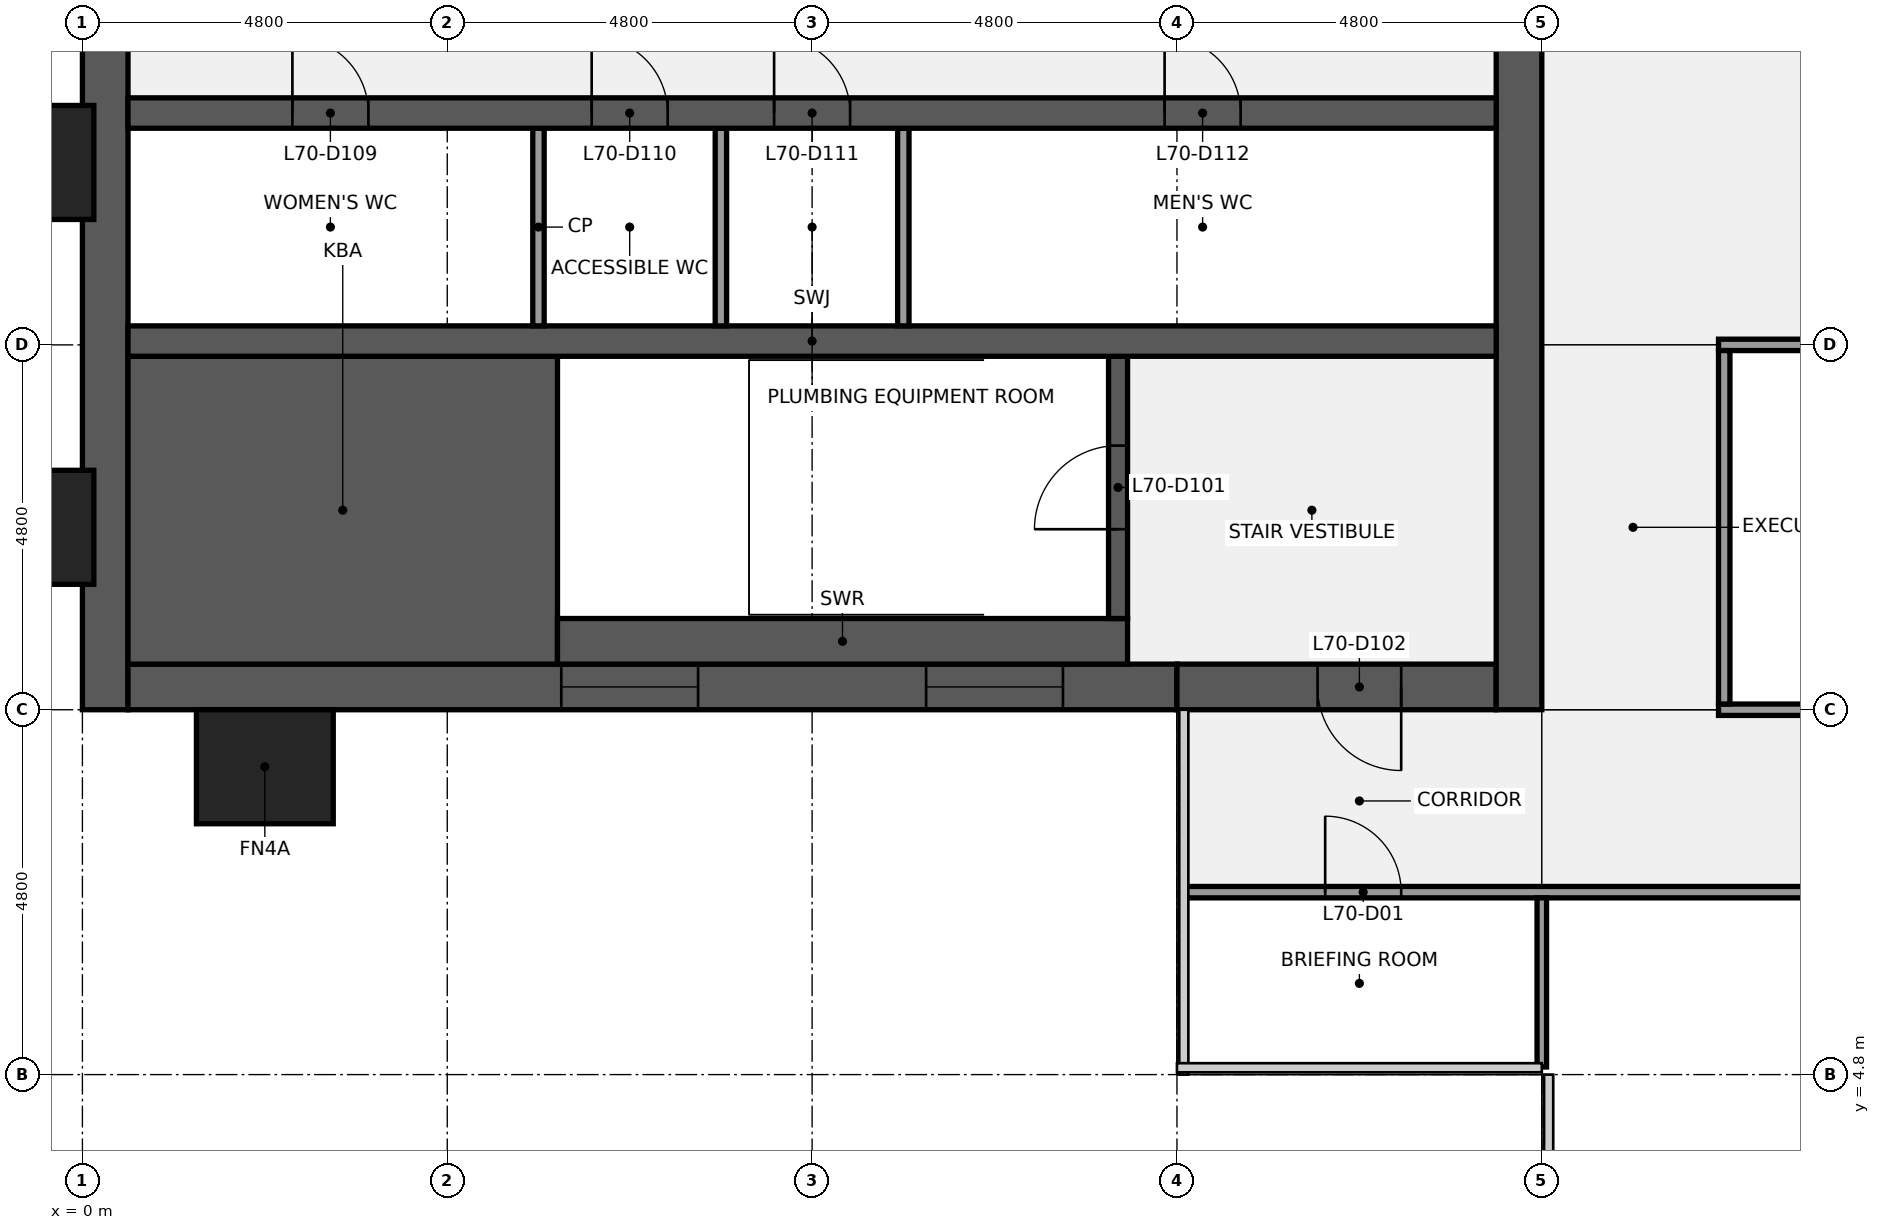
"""IFC4 building model, lengths in metres.
Left out: names, types, materials, properties, quantities, classifications, styles, units other than length and angle.
Written with IfcOpenShell. Run it as: python <this file> out.ifc"""

import sys

from ifc_helpers import new_model, si_unit, direction, frame, frame_2d, origin, origin_2d, place, context, subcontext, project, spatial, rectangle, extrude, element, fill, save


model = new_model("IFC4")
c1 = context("Model", 3, precision=1e-05, world=origin(), true_north=direction((0.0, 1.0)))
c2 = subcontext(c1, "Body", "Model", "MODEL_VIEW")
j1 = project(units=[si_unit("LENGTHUNIT", "METRE"), si_unit("PLANEANGLEUNIT", "RADIAN")], contexts=[c1])
p1 = place(None, origin())
s1 = spatial("IfcSite", under=j1, at=p1, CompositionType="ELEMENT")
p2 = place(p1, origin())
s2 = spatial("IfcBuilding", under=s1, at=p2, CompositionType="ELEMENT")
p3 = place(p2, frame((0.0, 0.0, 318.3)))
s3 = spatial("IfcBuildingStorey", under=s2, at=p3, CompositionType="ELEMENT", Elevation=318.3)
p4 = place(p3, frame((0.3, 9.6, 0.0), z_axis=(0.0, 0.0, 1.0), x_axis=(0.0, 1.0, 0.0)))
e1 = element("IfcWall", 1, at=p4, inside=s3, PredefinedType="SHEAR", context=c2, shape_type="SweptSolid", body=[
    extrude(rectangle(XDim=28.8, YDim=0.6, at=frame_2d((14.4, 0.0))), origin(), (0.0, 0.0, 1.0), 3.84),
])
p5 = place(p4, frame((8.85, 0.0, 0.9)))
e2 = element("IfcOpeningElement", 2, at=p5, cuts=e1, PredefinedType="OPENING", context=c2, shape_type="SweptSolid", body=[
    extrude(rectangle(XDim=1.5, YDim=1.5, at=frame_2d((0.75, 0.75))), frame((0.0, 0.31, 0.0), z_axis=(0.0, -1.0, 0.0), x_axis=(1.0, 0.0, 0.0)), (0.0, 0.0, 1.0), 0.62),
])
p6 = place(p4, frame((18.45, 0.0, 0.9)))
e3 = element("IfcOpeningElement", 3, at=p6, cuts=e1, PredefinedType="OPENING", context=c2, shape_type="SweptSolid", body=[
    extrude(rectangle(XDim=1.5, YDim=1.5, at=frame_2d((0.75, 0.75))), frame((0.0, 0.31, 0.0), z_axis=(0.0, -1.0, 0.0), x_axis=(1.0, 0.0, 0.0)), (0.0, 0.0, 1.0), 0.62),
])
p7 = place(p3, frame((14.4, 9.9, 0.0), z_axis=(0.0, 0.0, 1.0), x_axis=(-1.0, 0.0, 0.0)))
e4 = element("IfcWall", 4, at=p7, inside=s3, PredefinedType="SHEAR", context=c2, shape_type="SweptSolid", body=[
    extrude(rectangle(XDim=13.8, YDim=0.6, at=frame_2d((6.9, 0.0))), origin(), (0.0, 0.0, 1.0), 3.84),
])
p8 = place(p7, frame((6.3, 0.0, 0.9)))
e5 = element("IfcOpeningElement", 5, at=p8, cuts=e4, PredefinedType="OPENING", context=c2, shape_type="SweptSolid", body=[
    extrude(rectangle(XDim=1.8, YDim=1.5, at=frame_2d((0.9, 0.75))), frame((0.0, 0.31, 0.0), z_axis=(0.0, -1.0, 0.0), x_axis=(1.0, 0.0, 0.0)), (0.0, 0.0, 1.0), 0.62),
])
p9 = place(p7, frame((1.5, 0.0, 0.9)))
e6 = element("IfcOpeningElement", 6, at=p9, cuts=e4, PredefinedType="OPENING", context=c2, shape_type="SweptSolid", body=[
    extrude(rectangle(XDim=1.8, YDim=1.5, at=frame_2d((0.9, 0.75))), frame((0.0, 0.31, 0.0), z_axis=(0.0, -1.0, 0.0), x_axis=(1.0, 0.0, 0.0)), (0.0, 0.0, 1.0), 0.62),
])
p10 = place(p3, frame((18.6, 9.9, 0.0), z_axis=(0.0, 0.0, 1.0), x_axis=(-1.0, 0.0, 0.0)))
e7 = element("IfcWall", 7, at=p10, inside=s3, PredefinedType="SHEAR", context=c2, shape_type="SweptSolid", body=[
    extrude(rectangle(XDim=4.2, YDim=0.6, at=frame_2d((2.1, 0.0))), origin(), (0.0, 0.0, 1.0), 3.84),
])
p11 = place(p10, frame((1.25, 0.0, 0.0)))
e8 = element("IfcOpeningElement", 8, at=p11, cuts=e7, PredefinedType="OPENING", context=c2, shape_type="SweptSolid", body=[
    extrude(rectangle(XDim=1.1, YDim=2.1, at=frame_2d((0.55, 1.05))), frame((0.0, 0.31, 0.0), z_axis=(0.0, -1.0, 0.0), x_axis=(1.0, 0.0, 0.0)), (0.0, 0.0, 1.0), 0.62),
])
p12 = place(p3, frame((18.9, 38.4, 0.0), z_axis=(0.0, 0.0, 1.0), x_axis=(0.0, -1.0, 0.0)))
e9 = element("IfcWall", 9, at=p12, inside=s3, PredefinedType="SHEAR", context=c2, shape_type="SweptSolid", body=[
    extrude(rectangle(XDim=28.8, YDim=0.6, at=frame_2d((14.4, 0.0))), origin(), (0.0, 0.0, 1.0), 3.84),
])
p13 = place(p12, frame((18.3, 0.0, 0.0)))
e10 = element("IfcOpeningElement", 10, at=p13, cuts=e9, PredefinedType="OPENING", context=c2, shape_type="SweptSolid", body=[
    extrude(rectangle(XDim=1.8, YDim=2.1, at=frame_2d((0.9, 1.05))), frame((0.0, 0.31, 0.0), z_axis=(0.0, -1.0, 0.0), x_axis=(1.0, 0.0, 0.0)), (0.0, 0.0, 1.0), 0.62),
])
p14 = place(p12, frame((8.7, 0.0, 0.0)))
e11 = element("IfcOpeningElement", 11, at=p14, cuts=e9, PredefinedType="OPENING", context=c2, shape_type="SweptSolid", body=[
    extrude(rectangle(XDim=1.8, YDim=2.1, at=frame_2d((0.9, 1.05))), frame((0.0, 0.31, 0.0), z_axis=(0.0, -1.0, 0.0), x_axis=(1.0, 0.0, 0.0)), (0.0, 0.0, 1.0), 0.62),
])
p15 = place(p3, frame((0.6, 12.225, 0.0), z_axis=(0.0, 0.0, 1.0), x_axis=(1.0, 0.0, 0.0)))
e12 = element("IfcWall", 12, at=p15, inside=s3, PredefinedType="SHEAR", context=c2, shape_type="SweptSolid", body=[
    extrude(rectangle(XDim=5.65, YDim=4.05, at=frame_2d((2.825, 0.0))), origin(), (0.0, 0.0, 1.0), 3.84),
])
p16 = place(p3, frame((6.25, 10.5, 0.0), z_axis=(0.0, 0.0, 1.0), x_axis=(1.0, 0.0, 0.0)))
e13 = element("IfcWall", 13, at=p16, inside=s3, PredefinedType="SHEAR", context=c2, shape_type="SweptSolid", body=[
    extrude(rectangle(XDim=7.5, YDim=0.6, at=frame_2d((3.75, 0.0))), origin(), (0.0, 0.0, 1.0), 3.84),
])
p17 = place(p3, frame((13.625, 10.8, 0.0), z_axis=(0.0, 0.0, 1.0), x_axis=(0.0, 1.0, 0.0)))
e14 = element("IfcWall", 14, at=p17, inside=s3, PredefinedType="SHEAR", context=c2, shape_type="SweptSolid", body=[
    extrude(rectangle(XDim=3.45, YDim=0.25, at=frame_2d((1.725, 0.0))), origin(), (0.0, 0.0, 1.0), 3.84),
])
p18 = place(p17, frame((1.175, 0.0, 0.0)))
e15 = element("IfcOpeningElement", 15, at=p18, cuts=e14, PredefinedType="OPENING", context=c2, shape_type="SweptSolid", body=[
    extrude(rectangle(XDim=1.1, YDim=2.1, at=frame_2d((0.55, 1.05))), frame((0.0, 0.135, 0.0), z_axis=(0.0, -1.0, 0.0), x_axis=(1.0, 0.0, 0.0)), (0.0, 0.0, 1.0), 0.27),
])
p19 = place(p3, frame((0.6, 14.45, 0.0), z_axis=(0.0, 0.0, 1.0), x_axis=(1.0, 0.0, 0.0)))
e16 = element("IfcWall", 16, at=p19, inside=s3, PredefinedType="SHEAR", context=c2, shape_type="SweptSolid", body=[
    extrude(rectangle(XDim=18.0, YDim=0.4, at=frame_2d((9.0, 0.0))), origin(), (0.0, 0.0, 1.0), 3.84),
])
for number, where, z_axis, x_axis in (
    (17, (6.0, 14.65, 0.0), (0.0, 0.0, 1.0), (0.0, 1.0, 0.0)),
    (18, (8.4, 14.65, 0.0), (0.0, 0.0, 1.0), (0.0, 1.0, 0.0)),
    (19, (10.8, 14.65, 0.0), (0.0, 0.0, 1.0), (0.0, 1.0, 0.0)),
):
    element("IfcWall", number, at=place(p3, frame(where, z_axis=z_axis, x_axis=x_axis)), inside=s3, PredefinedType="PARTITIONING", context=c2, shape_type="SweptSolid", body=[
        extrude(rectangle(XDim=2.6, YDim=0.15, at=frame_2d((1.3, 0.0))), origin(), (0.0, 0.0, 1.0), 3.84),
    ])
p20 = place(p3, frame((0.6, 17.45, 0.0), z_axis=(0.0, 0.0, 1.0), x_axis=(1.0, 0.0, 0.0)))
e20 = element("IfcWall", 20, at=p20, inside=s3, PredefinedType="SHEAR", context=c2, shape_type="SweptSolid", body=[
    extrude(rectangle(XDim=18.0, YDim=0.4, at=frame_2d((9.0, 0.0))), origin(), (0.0, 0.0, 1.0), 3.84),
])
p21 = place(p20, frame((2.163, 0.0, 0.0)))
e21 = element("IfcOpeningElement", 21, at=p21, cuts=e20, PredefinedType="OPENING", context=c2, shape_type="SweptSolid", body=[
    extrude(rectangle(XDim=1.0, YDim=2.1, at=frame_2d((0.5, 1.05))), frame((0.0, 0.21, 0.0), z_axis=(0.0, -1.0, 0.0), x_axis=(1.0, 0.0, 0.0)), (0.0, 0.0, 1.0), 0.42),
])
p22 = place(p20, frame((6.1, 0.0, 0.0)))
e22 = element("IfcOpeningElement", 22, at=p22, cuts=e20, PredefinedType="OPENING", context=c2, shape_type="SweptSolid", body=[
    extrude(rectangle(XDim=1.0, YDim=2.1, at=frame_2d((0.5, 1.05))), frame((0.0, 0.21, 0.0), z_axis=(0.0, -1.0, 0.0), x_axis=(1.0, 0.0, 0.0)), (0.0, 0.0, 1.0), 0.42),
])
p23 = place(p20, frame((8.5, 0.0, 0.0)))
e23 = element("IfcOpeningElement", 23, at=p23, cuts=e20, PredefinedType="OPENING", context=c2, shape_type="SweptSolid", body=[
    extrude(rectangle(XDim=1.0, YDim=2.1, at=frame_2d((0.5, 1.05))), frame((0.0, 0.21, 0.0), z_axis=(0.0, -1.0, 0.0), x_axis=(1.0, 0.0, 0.0)), (0.0, 0.0, 1.0), 0.42),
])
p24 = place(p20, frame((13.637, 0.0, 0.0)))
e24 = element("IfcOpeningElement", 24, at=p24, cuts=e20, PredefinedType="OPENING", context=c2, shape_type="SweptSolid", body=[
    extrude(rectangle(XDim=1.0, YDim=2.1, at=frame_2d((0.5, 1.05))), frame((0.0, 0.21, 0.0), z_axis=(0.0, -1.0, 0.0), x_axis=(1.0, 0.0, 0.0)), (0.0, 0.0, 1.0), 0.42),
])
p25 = place(p3, frame((14.5, 7.2, 0.0), z_axis=(0.0, 0.0, 1.0), x_axis=(1.0, 0.0, 0.0)))
e25 = element("IfcWall", 25, at=p25, inside=s3, PredefinedType="PARTITIONING", context=c2, shape_type="SweptSolid", body=[
    extrude(rectangle(XDim=28.6, YDim=0.15, at=frame_2d((14.3, 0.0))), origin(), (0.0, 0.0, 1.0), 2.87),
])
p26 = place(p25, frame((1.85, 0.0, 0.0)))
e26 = element("IfcOpeningElement", 26, at=p26, cuts=e25, PredefinedType="OPENING", context=c2, shape_type="SweptSolid", body=[
    extrude(rectangle(XDim=1.0, YDim=2.1, at=frame_2d((0.5, 1.05))), frame((0.0, 0.085, 0.0), z_axis=(0.0, -1.0, 0.0), x_axis=(1.0, 0.0, 0.0)), (0.0, 0.0, 1.0), 0.17),
])
p27 = place(p25, frame((9.0, 0.0, 0.0)))
e27 = element("IfcOpeningElement", 27, at=p27, cuts=e25, PredefinedType="OPENING", context=c2, shape_type="SweptSolid", body=[
    extrude(rectangle(XDim=1.0, YDim=2.1, at=frame_2d((0.5, 1.05))), frame((0.0, 0.085, 0.0), z_axis=(0.0, -1.0, 0.0), x_axis=(1.0, 0.0, 0.0)), (0.0, 0.0, 1.0), 0.17),
])
p28 = place(p25, frame((18.6, 0.0, 0.0)))
e28 = element("IfcOpeningElement", 28, at=p28, cuts=e25, PredefinedType="OPENING", context=c2, shape_type="SweptSolid", body=[
    extrude(rectangle(XDim=1.0, YDim=2.1, at=frame_2d((0.5, 1.05))), frame((0.0, 0.085, 0.0), z_axis=(0.0, -1.0, 0.0), x_axis=(1.0, 0.0, 0.0)), (0.0, 0.0, 1.0), 0.17),
])
p29 = place(p25, frame((25.75, 0.0, 0.0)))
e29 = element("IfcOpeningElement", 29, at=p29, cuts=e25, PredefinedType="OPENING", context=c2, shape_type="SweptSolid", body=[
    extrude(rectangle(XDim=1.0, YDim=2.1, at=frame_2d((0.5, 1.05))), frame((0.0, 0.085, 0.0), z_axis=(0.0, -1.0, 0.0), x_axis=(1.0, 0.0, 0.0)), (0.0, 0.0, 1.0), 0.17),
])
p30 = place(p3, frame((21.525, 9.6, 0.0), z_axis=(0.0, 0.0, 1.0), x_axis=(1.0, 0.0, 0.0)))
e30 = element("IfcWall", 30, at=p30, inside=s3, PredefinedType="PARTITIONING", context=c2, shape_type="SweptSolid", body=[
    extrude(rectangle(XDim=14.55, YDim=0.15, at=frame_2d((7.275, 0.0))), origin(), (0.0, 0.0, 1.0), 2.87),
])
p31 = place(p30, frame((3.175, 0.0, 0.0)))
e31 = element("IfcOpeningElement", 31, at=p31, cuts=e30, PredefinedType="OPENING", context=c2, shape_type="SweptSolid", body=[
    extrude(rectangle(XDim=1.0, YDim=2.1, at=frame_2d((0.5, 1.05))), frame((0.0, 0.085, 0.0), z_axis=(0.0, -1.0, 0.0), x_axis=(1.0, 0.0, 0.0)), (0.0, 0.0, 1.0), 0.17),
])
p32 = place(p30, frame((10.375, 0.0, 0.0)))
e32 = element("IfcOpeningElement", 32, at=p32, cuts=e30, PredefinedType="OPENING", context=c2, shape_type="SweptSolid", body=[
    extrude(rectangle(XDim=1.0, YDim=2.1, at=frame_2d((0.5, 1.05))), frame((0.0, 0.085, 0.0), z_axis=(0.0, -1.0, 0.0), x_axis=(1.0, 0.0, 0.0)), (0.0, 0.0, 1.0), 0.17),
])
p33 = place(p3, frame((21.525, 14.4, 0.0), z_axis=(0.0, 0.0, 1.0), x_axis=(1.0, 0.0, 0.0)))
e33 = element("IfcWall", 33, at=p33, inside=s3, PredefinedType="PARTITIONING", context=c2, shape_type="SweptSolid", body=[
    extrude(rectangle(XDim=2.55, YDim=0.15, at=frame_2d((1.275, 0.0))), origin(), (0.0, 0.0, 1.0), 2.87),
])
p34 = place(p3, frame((19.2, 4.9, 0.0), z_axis=(0.0, 0.0, 1.0), x_axis=(0.0, 1.0, 0.0)))
e34 = element("IfcWall", 34, at=p34, inside=s3, PredefinedType="PARTITIONING", context=c2, shape_type="SweptSolid", body=[
    extrude(rectangle(XDim=2.225, YDim=0.125, at=frame_2d((1.113, 0.0))), origin(), (0.0, 0.0, 1.0), 2.87),
])
p35 = place(p3, frame((21.6, 9.675, 0.0), z_axis=(0.0, 0.0, 1.0), x_axis=(0.0, 1.0, 0.0)))
e35 = element("IfcWall", 35, at=p35, inside=s3, PredefinedType="PARTITIONING", context=c2, shape_type="SweptSolid", body=[
    extrude(rectangle(XDim=4.65, YDim=0.15, at=frame_2d((2.325, 0.0))), origin(), (0.0, 0.0, 1.0), 2.87),
])
for number, where, z_axis, x_axis in (
    (36, (-0.75, 12.0, 0.0), (0.0, 0.0, 1.0), (0.0, 1.0, 0.0)),
    (37, (-0.75, 16.8, 0.0), (0.0, 0.0, 1.0), (0.0, 1.0, 0.0)),
    (38, (2.4, 8.85, 0.0), (0.0, 0.0, 1.0), (1.0, 0.0, 0.0)),
):
    element("IfcColumn", number, at=place(p3, frame(where, z_axis=z_axis, x_axis=x_axis)), inside=s3, PredefinedType="PILASTER", context=c2, shape_type="SweptSolid", body=[
        extrude(rectangle(XDim=1.8, YDim=1.5, at=origin_2d()), origin(), (0.0, 0.0, 1.0), 4.0),
    ])
p36 = place(p18, origin())
e39 = element("IfcDoor", 39, at=p36, inside=s3, OperationType="SINGLE_SWING_LEFT", PredefinedType="DOOR", context=c2, shape_type="SweptSolid", body=[
    extrude(rectangle(XDim=1.1, YDim=2.1, at=frame_2d((0.55, 1.05))), frame((0.0, 0.025, 0.0), z_axis=(0.0, -1.0, 0.0), x_axis=(1.0, 0.0, 0.0)), (0.0, 0.0, 1.0), 0.05),
])
fill(e15, e39)
p37 = place(p11, origin())
e40 = element("IfcDoor", 40, at=p37, inside=s3, OperationType="SINGLE_SWING_LEFT", PredefinedType="DOOR", context=c2, shape_type="SweptSolid", body=[
    extrude(rectangle(XDim=1.1, YDim=2.1, at=frame_2d((0.55, 1.05))), frame((0.0, 0.025, 0.0), z_axis=(0.0, -1.0, 0.0), x_axis=(1.0, 0.0, 0.0)), (0.0, 0.0, 1.0), 0.05),
])
fill(e8, e40)
p38 = place(p21, origin())
e41 = element("IfcDoor", 41, at=p38, inside=s3, OperationType="SINGLE_SWING_LEFT", PredefinedType="DOOR", context=c2, shape_type="SweptSolid", body=[
    extrude(rectangle(XDim=1.0, YDim=2.1, at=frame_2d((0.5, 1.05))), frame((0.0, 0.025, 0.0), z_axis=(0.0, -1.0, 0.0), x_axis=(1.0, 0.0, 0.0)), (0.0, 0.0, 1.0), 0.05),
])
fill(e21, e41)
p39 = place(p22, origin())
e42 = element("IfcDoor", 42, at=p39, inside=s3, OperationType="SINGLE_SWING_LEFT", PredefinedType="DOOR", context=c2, shape_type="SweptSolid", body=[
    extrude(rectangle(XDim=1.0, YDim=2.1, at=frame_2d((0.5, 1.05))), frame((0.0, 0.025, 0.0), z_axis=(0.0, -1.0, 0.0), x_axis=(1.0, 0.0, 0.0)), (0.0, 0.0, 1.0), 0.05),
])
fill(e22, e42)
p40 = place(p23, origin())
e43 = element("IfcDoor", 43, at=p40, inside=s3, OperationType="SINGLE_SWING_LEFT", PredefinedType="DOOR", context=c2, shape_type="SweptSolid", body=[
    extrude(rectangle(XDim=1.0, YDim=2.1, at=frame_2d((0.5, 1.05))), frame((0.0, 0.025, 0.0), z_axis=(0.0, -1.0, 0.0), x_axis=(1.0, 0.0, 0.0)), (0.0, 0.0, 1.0), 0.05),
])
fill(e23, e43)
p41 = place(p24, origin())
e44 = element("IfcDoor", 44, at=p41, inside=s3, OperationType="SINGLE_SWING_LEFT", PredefinedType="DOOR", context=c2, shape_type="SweptSolid", body=[
    extrude(rectangle(XDim=1.0, YDim=2.1, at=frame_2d((0.5, 1.05))), frame((0.0, 0.025, 0.0), z_axis=(0.0, -1.0, 0.0), x_axis=(1.0, 0.0, 0.0)), (0.0, 0.0, 1.0), 0.05),
])
fill(e24, e44)
p42 = place(p8, origin())
e45 = element("IfcWindow", 45, at=p42, inside=s3, PartitioningType="SINGLE_PANEL", PredefinedType="WINDOW", context=c2, shape_type="SweptSolid", body=[
    extrude(rectangle(XDim=1.8, YDim=1.5, at=frame_2d((0.9, 0.75))), frame((0.0, 0.03, 0.0), z_axis=(0.0, -1.0, 0.0), x_axis=(1.0, 0.0, 0.0)), (0.0, 0.0, 1.0), 0.06),
])
fill(e5, e45)
p43 = place(p9, origin())
e46 = element("IfcWindow", 46, at=p43, inside=s3, PartitioningType="SINGLE_PANEL", PredefinedType="WINDOW", context=c2, shape_type="SweptSolid", body=[
    extrude(rectangle(XDim=1.8, YDim=1.5, at=frame_2d((0.9, 0.75))), frame((0.0, 0.03, 0.0), z_axis=(0.0, -1.0, 0.0), x_axis=(1.0, 0.0, 0.0)), (0.0, 0.0, 1.0), 0.06),
])
fill(e6, e46)
p44 = place(p26, origin())
e47 = element("IfcDoor", 47, at=p44, inside=s3, OperationType="SINGLE_SWING_LEFT", PredefinedType="DOOR", context=c2, shape_type="SweptSolid", body=[
    extrude(rectangle(XDim=1.0, YDim=2.1, at=frame_2d((0.5, 1.05))), frame((0.0, 0.025, 0.0), z_axis=(0.0, -1.0, 0.0), x_axis=(1.0, 0.0, 0.0)), (0.0, 0.0, 1.0), 0.05),
])
fill(e26, e47)
save(model, sys.argv[1])
